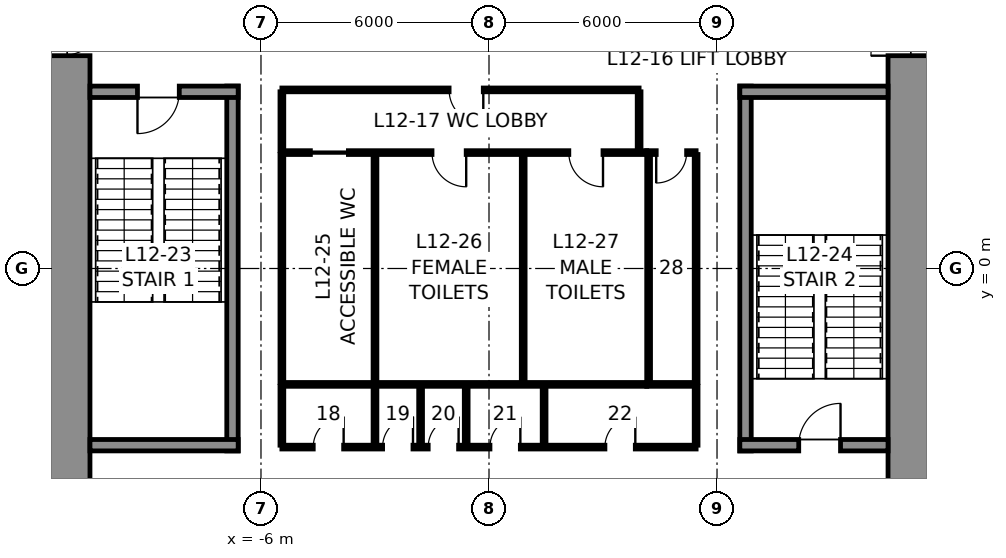
"""IFC4 building model, lengths in metres.
Left out: names, types, materials, properties, quantities, classifications, styles, units other than length and angle.
Written with IfcOpenShell. Run it as: python <this file> out.ifc"""

import sys

from ifc_helpers import new_model, si_unit, direction, frame, frame_2d, origin, place, context, subcontext, project, spatial, rectangle, extrude, element, fill, save


model = new_model("IFC4")
c1 = context("Model", 3, precision=1e-05, world=origin(), true_north=direction((0.0, 1.0)))
c2 = subcontext(c1, "Body", "Model", "MODEL_VIEW")
j1 = project(units=[si_unit("LENGTHUNIT", "METRE"), si_unit("PLANEANGLEUNIT", "RADIAN")], contexts=[c1])
p1 = place(None, origin())
s1 = spatial("IfcSite", under=j1, at=p1, CompositionType="ELEMENT")
p2 = place(p1, origin())
s2 = spatial("IfcBuilding", under=s1, at=p2, CompositionType="ELEMENT")
p3 = place(p2, frame((0.0, 0.0, 65.0)))
s3 = spatial("IfcBuildingStorey", under=s2, at=p3, CompositionType="ELEMENT", Elevation=65.0)
p4 = place(p3, frame((11.25, 10.5, 0.0), z_axis=(0.0, 0.0, 1.0), x_axis=(0.0, -1.0, 0.0)))
e1 = element("IfcWall", 1, at=p4, inside=s3, PredefinedType="SHEAR", context=c2, shape_type="SweptSolid", body=[
    extrude(rectangle(XDim=21.0, YDim=1.5, at=frame_2d((10.5, 0.0))), origin(), (0.0, 0.0, 1.0), 5.5),
])
p5 = place(p4, frame((3.7, 0.0, 0.0)))
e2 = element("IfcOpeningElement", 2, at=p5, cuts=e1, PredefinedType="OPENING", context=c2, shape_type="SweptSolid", body=[
    extrude(rectangle(XDim=1.2, YDim=2.3, at=frame_2d((0.6, 1.15))), frame((0.0, 0.76, 0.0), z_axis=(0.0, -1.0, 0.0), x_axis=(1.0, 0.0, 0.0)), (0.0, 0.0, 1.0), 1.52),
])
p6 = place(p4, frame((16.1, 0.0, 0.0)))
e3 = element("IfcOpeningElement", 3, at=p6, cuts=e1, PredefinedType="OPENING", context=c2, shape_type="SweptSolid", body=[
    extrude(rectangle(XDim=1.2, YDim=2.3, at=frame_2d((0.6, 1.15))), frame((0.0, 0.76, 0.0), z_axis=(0.0, -1.0, 0.0), x_axis=(1.0, 0.0, 0.0)), (0.0, 0.0, 1.0), 1.52),
])
p7 = place(p3, frame((-11.25, -10.5, 0.0), z_axis=(0.0, 0.0, 1.0), x_axis=(0.0, 1.0, 0.0)))
e4 = element("IfcWall", 4, at=p7, inside=s3, PredefinedType="SHEAR", context=c2, shape_type="SweptSolid", body=[
    extrude(rectangle(XDim=21.0, YDim=1.5, at=frame_2d((10.5, 0.0))), origin(), (0.0, 0.0, 1.0), 5.5),
])
p8 = place(p7, frame((16.1, 0.0, 0.0)))
e5 = element("IfcOpeningElement", 5, at=p8, cuts=e4, PredefinedType="OPENING", context=c2, shape_type="SweptSolid", body=[
    extrude(rectangle(XDim=1.2, YDim=2.3, at=frame_2d((0.6, 1.15))), frame((0.0, 0.76, 0.0), z_axis=(0.0, -1.0, 0.0), x_axis=(1.0, 0.0, 0.0)), (0.0, 0.0, 1.0), 1.52),
])
p9 = place(p7, frame((3.7, 0.0, 0.0)))
e6 = element("IfcOpeningElement", 6, at=p9, cuts=e4, PredefinedType="OPENING", context=c2, shape_type="SweptSolid", body=[
    extrude(rectangle(XDim=1.2, YDim=2.3, at=frame_2d((0.6, 1.15))), frame((0.0, 0.76, 0.0), z_axis=(0.0, -1.0, 0.0), x_axis=(1.0, 0.0, 0.0)), (0.0, 0.0, 1.0), 1.52),
])
p10 = place(p3, frame((-6.75, -4.8, 0.0), z_axis=(0.0, 0.0, 1.0), x_axis=(0.0, 1.0, 0.0)))
e7 = element("IfcWall", 7, at=p10, inside=s3, PredefinedType="SOLIDWALL", context=c2, shape_type="SweptSolid", body=[
    extrude(rectangle(XDim=9.6, YDim=0.3, at=frame_2d((4.8, 0.0))), origin(), (0.0, 0.0, 1.0), 5.25),
])
p11 = place(p3, frame((-10.5, 4.65, 0.0), z_axis=(0.0, 0.0, 1.0), x_axis=(1.0, 0.0, 0.0)))
e8 = element("IfcWall", 8, at=p11, inside=s3, PredefinedType="SOLIDWALL", context=c2, shape_type="SweptSolid", body=[
    extrude(rectangle(XDim=3.9, YDim=0.3, at=frame_2d((1.95, 0.0))), origin(), (0.0, 0.0, 1.0), 5.25),
])
p12 = place(p11, frame((1.25, 0.0, 0.0)))
e9 = element("IfcOpeningElement", 9, at=p12, cuts=e8, PredefinedType="OPENING", context=c2, shape_type="SweptSolid", body=[
    extrude(rectangle(XDim=1.1, YDim=2.3, at=frame_2d((0.55, 1.15))), frame((0.0, 0.16, 0.0), z_axis=(0.0, -1.0, 0.0), x_axis=(1.0, 0.0, 0.0)), (0.0, 0.0, 1.0), 0.32),
])
p13 = place(p3, frame((-6.6, -4.65, 0.0), z_axis=(0.0, 0.0, 1.0), x_axis=(-1.0, 0.0, 0.0)))
e10 = element("IfcWall", 10, at=p13, inside=s3, PredefinedType="SOLIDWALL", context=c2, shape_type="SweptSolid", body=[
    extrude(rectangle(XDim=3.9, YDim=0.3, at=frame_2d((1.95, 0.0))), origin(), (0.0, 0.0, 1.0), 5.25),
])
p14 = place(p3, frame((6.75, -4.8, 0.0), z_axis=(0.0, 0.0, 1.0), x_axis=(0.0, 1.0, 0.0)))
e11 = element("IfcWall", 11, at=p14, inside=s3, PredefinedType="SOLIDWALL", context=c2, shape_type="SweptSolid", body=[
    extrude(rectangle(XDim=9.6, YDim=0.3, at=frame_2d((4.8, 0.0))), origin(), (0.0, 0.0, 1.0), 5.25),
])
p15 = place(p3, frame((6.6, 4.65, 0.0), z_axis=(0.0, 0.0, 1.0), x_axis=(1.0, 0.0, 0.0)))
e12 = element("IfcWall", 12, at=p15, inside=s3, PredefinedType="SOLIDWALL", context=c2, shape_type="SweptSolid", body=[
    extrude(rectangle(XDim=3.9, YDim=0.3, at=frame_2d((1.95, 0.0))), origin(), (0.0, 0.0, 1.0), 5.25),
])
p16 = place(p3, frame((10.5, -4.65, 0.0), z_axis=(0.0, 0.0, 1.0), x_axis=(-1.0, 0.0, 0.0)))
e13 = element("IfcWall", 13, at=p16, inside=s3, PredefinedType="SOLIDWALL", context=c2, shape_type="SweptSolid", body=[
    extrude(rectangle(XDim=3.9, YDim=0.3, at=frame_2d((1.95, 0.0))), origin(), (0.0, 0.0, 1.0), 5.25),
])
p17 = place(p16, frame((1.25, 0.0, 0.0)))
e14 = element("IfcOpeningElement", 14, at=p17, cuts=e13, PredefinedType="OPENING", context=c2, shape_type="SweptSolid", body=[
    extrude(rectangle(XDim=1.1, YDim=2.3, at=frame_2d((0.55, 1.15))), frame((0.0, 0.16, 0.0), z_axis=(0.0, -1.0, 0.0), x_axis=(1.0, 0.0, 0.0)), (0.0, 0.0, 1.0), 0.32),
])
p18 = place(p3, frame((-5.45, 3.05, 0.0), z_axis=(0.0, 0.0, 1.0), x_axis=(1.0, 0.0, 0.0)))
e15 = element("IfcWall", 15, at=p18, inside=s3, PredefinedType="PARTITIONING", context=c2, shape_type="SweptSolid", body=[
    extrude(rectangle(XDim=9.6, YDim=0.1, at=frame_2d((4.8, 0.0))), origin(), (0.0, 0.0, 1.0), 5.25),
])
p19 = place(p18, frame((0.75, 0.0, 0.0)))
e16 = element("IfcOpeningElement", 16, at=p19, cuts=e15, PredefinedType="OPENING", context=c2, shape_type="SweptSolid", body=[
    extrude(rectangle(XDim=1.0, YDim=2.3, at=frame_2d((0.5, 1.15))), frame((0.0, 0.06, 0.0), z_axis=(0.0, -1.0, 0.0), x_axis=(1.0, 0.0, 0.0)), (0.0, 0.0, 1.0), 0.12),
])
p20 = place(p18, frame((3.95, 0.0, 0.0)))
e17 = element("IfcOpeningElement", 17, at=p20, cuts=e15, PredefinedType="OPENING", context=c2, shape_type="SweptSolid", body=[
    extrude(rectangle(XDim=0.9, YDim=2.3, at=frame_2d((0.45, 1.15))), frame((0.0, 0.06, 0.0), z_axis=(0.0, -1.0, 0.0), x_axis=(1.0, 0.0, 0.0)), (0.0, 0.0, 1.0), 0.12),
])
p21 = place(p18, frame((7.55, 0.0, 0.0)))
e18 = element("IfcOpeningElement", 18, at=p21, cuts=e15, PredefinedType="OPENING", context=c2, shape_type="SweptSolid", body=[
    extrude(rectangle(XDim=0.9, YDim=2.3, at=frame_2d((0.45, 1.15))), frame((0.0, 0.06, 0.0), z_axis=(0.0, -1.0, 0.0), x_axis=(1.0, 0.0, 0.0)), (0.0, 0.0, 1.0), 0.12),
])
p22 = place(p3, frame((4.15, 3.05, 0.0), z_axis=(0.0, 0.0, 1.0), x_axis=(1.0, 0.0, 0.0)))
e19 = element("IfcWall", 19, at=p22, inside=s3, PredefinedType="PARTITIONING", context=c2, shape_type="SweptSolid", body=[
    extrude(rectangle(XDim=1.3, YDim=0.1, at=frame_2d((0.65, 0.0))), origin(), (0.0, 0.0, 1.0), 5.25),
])
p23 = place(p22, frame((0.25, 0.0, 0.0)))
e20 = element("IfcOpeningElement", 20, at=p23, cuts=e19, PredefinedType="OPENING", context=c2, shape_type="SweptSolid", body=[
    extrude(rectangle(XDim=0.8, YDim=2.3, at=frame_2d((0.4, 1.15))), frame((0.0, 0.06, 0.0), z_axis=(0.0, -1.0, 0.0), x_axis=(1.0, 0.0, 0.0)), (0.0, 0.0, 1.0), 0.12),
])
p24 = place(p3, frame((4.15, -3.05, 0.0), z_axis=(0.0, 0.0, 1.0), x_axis=(-1.0, 0.0, 0.0)))
e21 = element("IfcWall", 21, at=p24, inside=s3, PredefinedType="PARTITIONING", context=c2, shape_type="SweptSolid", body=[
    extrude(rectangle(XDim=9.6, YDim=0.1, at=frame_2d((4.8, 0.0))), origin(), (0.0, 0.0, 1.0), 5.25),
])
p25 = place(p3, frame((5.45, -3.05, 0.0), z_axis=(0.0, 0.0, 1.0), x_axis=(-1.0, 0.0, 0.0)))
e22 = element("IfcWall", 22, at=p25, inside=s3, PredefinedType="PARTITIONING", context=c2, shape_type="SweptSolid", body=[
    extrude(rectangle(XDim=1.3, YDim=0.1, at=frame_2d((0.65, 0.0))), origin(), (0.0, 0.0, 1.0), 5.25),
])
for number, where, z_axis, x_axis in (
    (23, (5.45, 3.0, 0.0), (0.0, 0.0, 1.0), (0.0, -1.0, 0.0)),
    (24, (-5.45, -3.0, 0.0), (0.0, 0.0, 1.0), (0.0, 1.0, 0.0)),
    (25, (-3.0, -3.0, 0.0), (0.0, 0.0, 1.0), (0.0, 1.0, 0.0)),
    (26, (0.9, -3.0, 0.0), (0.0, 0.0, 1.0), (0.0, 1.0, 0.0)),
    (27, (4.2, -3.0, 0.0), (0.0, 0.0, 1.0), (0.0, 1.0, 0.0)),
):
    element("IfcWall", number, at=place(p3, frame(where, z_axis=z_axis, x_axis=x_axis)), inside=s3, PredefinedType="PARTITIONING", context=c2, shape_type="SweptSolid", body=[
        extrude(rectangle(XDim=6.0, YDim=0.1, at=frame_2d((3.0, 0.0))), origin(), (0.0, 0.0, 1.0), 5.25),
    ])
p26 = place(p3, frame((-5.45, 4.7, 0.0), z_axis=(0.0, 0.0, 1.0), x_axis=(1.0, 0.0, 0.0)))
e28 = element("IfcWall", 28, at=p26, inside=s3, PredefinedType="PARTITIONING", context=c2, shape_type="SweptSolid", body=[
    extrude(rectangle(XDim=9.4, YDim=0.1, at=frame_2d((4.7, 0.0))), origin(), (0.0, 0.0, 1.0), 5.25),
])
p27 = place(p26, frame((4.4, 0.0, 0.0)))
e29 = element("IfcOpeningElement", 29, at=p27, cuts=e28, PredefinedType="OPENING", context=c2, shape_type="SweptSolid", body=[
    extrude(rectangle(XDim=0.9, YDim=2.3, at=frame_2d((0.45, 1.15))), frame((0.0, 0.06, 0.0), z_axis=(0.0, -1.0, 0.0), x_axis=(1.0, 0.0, 0.0)), (0.0, 0.0, 1.0), 0.12),
])
for number, where, z_axis, x_axis in (
    (30, (-5.45, 3.1, 0.0), (0.0, 0.0, 1.0), (0.0, 1.0, 0.0)),
    (31, (3.95, 3.1, 0.0), (0.0, 0.0, 1.0), (0.0, 1.0, 0.0)),
):
    element("IfcWall", number, at=place(p3, frame(where, z_axis=z_axis, x_axis=x_axis)), inside=s3, PredefinedType="PARTITIONING", context=c2, shape_type="SweptSolid", body=[
        extrude(rectangle(XDim=1.55, YDim=0.1, at=frame_2d((0.775, 0.0))), origin(), (0.0, 0.0, 1.0), 5.25),
    ])
p28 = place(p3, frame((5.45, -4.7, 0.0), z_axis=(0.0, 0.0, 1.0), x_axis=(-1.0, 0.0, 0.0)))
e32 = element("IfcWall", 32, at=p28, inside=s3, PredefinedType="PARTITIONING", context=c2, shape_type="SweptSolid", body=[
    extrude(rectangle(XDim=10.9, YDim=0.1, at=frame_2d((5.45, 0.0))), origin(), (0.0, 0.0, 1.0), 5.25),
])
p29 = place(p28, frame((9.275, 0.0, 0.0)))
e33 = element("IfcOpeningElement", 33, at=p29, cuts=e32, PredefinedType="OPENING", context=c2, shape_type="SweptSolid", body=[
    extrude(rectangle(XDim=0.8, YDim=2.3, at=frame_2d((0.4, 1.15))), frame((0.0, 0.06, 0.0), z_axis=(0.0, -1.0, 0.0), x_axis=(1.0, 0.0, 0.0)), (0.0, 0.0, 1.0), 0.12),
])
p30 = place(p28, frame((7.45, 0.0, 0.0)))
e34 = element("IfcOpeningElement", 34, at=p30, cuts=e32, PredefinedType="OPENING", context=c2, shape_type="SweptSolid", body=[
    extrude(rectangle(XDim=0.8, YDim=2.3, at=frame_2d((0.4, 1.15))), frame((0.0, 0.06, 0.0), z_axis=(0.0, -1.0, 0.0), x_axis=(1.0, 0.0, 0.0)), (0.0, 0.0, 1.0), 0.12),
])
p31 = place(p28, frame((6.25, 0.0, 0.0)))
e35 = element("IfcOpeningElement", 35, at=p31, cuts=e32, PredefinedType="OPENING", context=c2, shape_type="SweptSolid", body=[
    extrude(rectangle(XDim=0.8, YDim=2.3, at=frame_2d((0.4, 1.15))), frame((0.0, 0.06, 0.0), z_axis=(0.0, -1.0, 0.0), x_axis=(1.0, 0.0, 0.0)), (0.0, 0.0, 1.0), 0.12),
])
p32 = place(p28, frame((4.625, 0.0, 0.0)))
e36 = element("IfcOpeningElement", 36, at=p32, cuts=e32, PredefinedType="OPENING", context=c2, shape_type="SweptSolid", body=[
    extrude(rectangle(XDim=0.8, YDim=2.3, at=frame_2d((0.4, 1.15))), frame((0.0, 0.06, 0.0), z_axis=(0.0, -1.0, 0.0), x_axis=(1.0, 0.0, 0.0)), (0.0, 0.0, 1.0), 0.12),
])
p33 = place(p28, frame((1.6, 0.0, 0.0)))
e37 = element("IfcOpeningElement", 37, at=p33, cuts=e32, PredefinedType="OPENING", context=c2, shape_type="SweptSolid", body=[
    extrude(rectangle(XDim=0.8, YDim=2.3, at=frame_2d((0.4, 1.15))), frame((0.0, 0.06, 0.0), z_axis=(0.0, -1.0, 0.0), x_axis=(1.0, 0.0, 0.0)), (0.0, 0.0, 1.0), 0.12),
])
for number, where, z_axis, x_axis in (
    (38, (-5.45, -3.1, 0.0), (0.0, 0.0, 1.0), (0.0, -1.0, 0.0)),
    (39, (5.45, -3.1, 0.0), (0.0, 0.0, 1.0), (0.0, -1.0, 0.0)),
    (40, (-3.0, -3.1, 0.0), (0.0, 0.0, 1.0), (0.0, -1.0, 0.0)),
    (41, (-1.8, -3.1, 0.0), (0.0, 0.0, 1.0), (0.0, -1.0, 0.0)),
    (42, (-0.6, -3.1, 0.0), (0.0, 0.0, 1.0), (0.0, -1.0, 0.0)),
    (43, (1.45, -3.1, 0.0), (0.0, 0.0, 1.0), (0.0, -1.0, 0.0)),
):
    element("IfcWall", number, at=place(p3, frame(where, z_axis=z_axis, x_axis=x_axis)), inside=s3, PredefinedType="PARTITIONING", context=c2, shape_type="SweptSolid", body=[
        extrude(rectangle(XDim=1.55, YDim=0.1, at=frame_2d((0.775, 0.0))), origin(), (0.0, 0.0, 1.0), 5.25),
    ])
p34 = place(p12, frame((1.1, 0.0, 0.0), z_axis=(0.0, 0.0, 1.0), x_axis=(-1.0, 0.0, 0.0)))
e44 = element("IfcDoor", 44, at=p34, inside=s3, OperationType="SINGLE_SWING_RIGHT", PredefinedType="DOOR", context=c2, shape_type="SweptSolid", body=[
    extrude(rectangle(XDim=1.1, YDim=2.3, at=frame_2d((0.55, 1.15))), frame((0.0, 0.025, 0.0), z_axis=(0.0, -1.0, 0.0), x_axis=(1.0, 0.0, 0.0)), (0.0, 0.0, 1.0), 0.05),
])
fill(e9, e44)
p35 = place(p17, frame((1.1, 0.0, 0.0), z_axis=(0.0, 0.0, 1.0), x_axis=(-1.0, 0.0, 0.0)))
e45 = element("IfcDoor", 45, at=p35, inside=s3, OperationType="SINGLE_SWING_RIGHT", PredefinedType="DOOR", context=c2, shape_type="SweptSolid", body=[
    extrude(rectangle(XDim=1.1, YDim=2.3, at=frame_2d((0.55, 1.15))), frame((0.0, 0.025, 0.0), z_axis=(0.0, -1.0, 0.0), x_axis=(1.0, 0.0, 0.0)), (0.0, 0.0, 1.0), 0.05),
])
fill(e14, e45)
p36 = place(p19, frame((1.0, 0.0, 0.0), z_axis=(0.0, 0.0, 1.0), x_axis=(-1.0, 0.0, 0.0)))
e46 = element("IfcDoor", 46, at=p36, inside=s3, OperationType="SLIDING_TO_LEFT", PredefinedType="DOOR", context=c2, shape_type="SweptSolid", body=[
    extrude(rectangle(XDim=1.0, YDim=2.3, at=frame_2d((0.5, 1.15))), frame((0.0, 0.025, 0.0), z_axis=(0.0, -1.0, 0.0), x_axis=(1.0, 0.0, 0.0)), (0.0, 0.0, 1.0), 0.05),
])
fill(e16, e46)
p37 = place(p20, frame((0.9, 0.0, 0.0), z_axis=(0.0, 0.0, 1.0), x_axis=(-1.0, 0.0, 0.0)))
e47 = element("IfcDoor", 47, at=p37, inside=s3, OperationType="SINGLE_SWING_LEFT", PredefinedType="DOOR", context=c2, shape_type="SweptSolid", body=[
    extrude(rectangle(XDim=0.9, YDim=2.3, at=frame_2d((0.45, 1.15))), frame((0.0, 0.025, 0.0), z_axis=(0.0, -1.0, 0.0), x_axis=(1.0, 0.0, 0.0)), (0.0, 0.0, 1.0), 0.05),
])
fill(e17, e47)
p38 = place(p21, frame((0.9, 0.0, 0.0), z_axis=(0.0, 0.0, 1.0), x_axis=(-1.0, 0.0, 0.0)))
e48 = element("IfcDoor", 48, at=p38, inside=s3, OperationType="SINGLE_SWING_LEFT", PredefinedType="DOOR", context=c2, shape_type="SweptSolid", body=[
    extrude(rectangle(XDim=0.9, YDim=2.3, at=frame_2d((0.45, 1.15))), frame((0.0, 0.025, 0.0), z_axis=(0.0, -1.0, 0.0), x_axis=(1.0, 0.0, 0.0)), (0.0, 0.0, 1.0), 0.05),
])
fill(e18, e48)
p39 = place(p23, frame((0.8, 0.0, 0.0), z_axis=(0.0, 0.0, 1.0), x_axis=(-1.0, 0.0, 0.0)))
e49 = element("IfcDoor", 49, at=p39, inside=s3, OperationType="SINGLE_SWING_RIGHT", PredefinedType="DOOR", context=c2, shape_type="SweptSolid", body=[
    extrude(rectangle(XDim=0.8, YDim=2.3, at=frame_2d((0.4, 1.15))), frame((0.0, 0.025, 0.0), z_axis=(0.0, -1.0, 0.0), x_axis=(1.0, 0.0, 0.0)), (0.0, 0.0, 1.0), 0.05),
])
fill(e20, e49)
p40 = place(p27, frame((0.9, 0.0, 0.0), z_axis=(0.0, 0.0, 1.0), x_axis=(-1.0, 0.0, 0.0)))
e50 = element("IfcDoor", 50, at=p40, inside=s3, OperationType="SINGLE_SWING_LEFT", PredefinedType="DOOR", context=c2, shape_type="SweptSolid", body=[
    extrude(rectangle(XDim=0.9, YDim=2.3, at=frame_2d((0.45, 1.15))), frame((0.0, 0.025, 0.0), z_axis=(0.0, -1.0, 0.0), x_axis=(1.0, 0.0, 0.0)), (0.0, 0.0, 1.0), 0.05),
])
fill(e29, e50)
p41 = place(p29, frame((0.8, 0.0, 0.0), z_axis=(0.0, 0.0, 1.0), x_axis=(-1.0, 0.0, 0.0)))
e51 = element("IfcDoor", 51, at=p41, inside=s3, OperationType="SINGLE_SWING_RIGHT", PredefinedType="DOOR", context=c2, shape_type="SweptSolid", body=[
    extrude(rectangle(XDim=0.8, YDim=2.3, at=frame_2d((0.4, 1.15))), frame((0.0, 0.025, 0.0), z_axis=(0.0, -1.0, 0.0), x_axis=(1.0, 0.0, 0.0)), (0.0, 0.0, 1.0), 0.05),
])
fill(e33, e51)
p42 = place(p30, frame((0.8, 0.0, 0.0), z_axis=(0.0, 0.0, 1.0), x_axis=(-1.0, 0.0, 0.0)))
e52 = element("IfcDoor", 52, at=p42, inside=s3, OperationType="SINGLE_SWING_RIGHT", PredefinedType="DOOR", context=c2, shape_type="SweptSolid", body=[
    extrude(rectangle(XDim=0.8, YDim=2.3, at=frame_2d((0.4, 1.15))), frame((0.0, 0.025, 0.0), z_axis=(0.0, -1.0, 0.0), x_axis=(1.0, 0.0, 0.0)), (0.0, 0.0, 1.0), 0.05),
])
fill(e34, e52)
p43 = place(p31, frame((0.8, 0.0, 0.0), z_axis=(0.0, 0.0, 1.0), x_axis=(-1.0, 0.0, 0.0)))
e53 = element("IfcDoor", 53, at=p43, inside=s3, OperationType="SINGLE_SWING_RIGHT", PredefinedType="DOOR", context=c2, shape_type="SweptSolid", body=[
    extrude(rectangle(XDim=0.8, YDim=2.3, at=frame_2d((0.4, 1.15))), frame((0.0, 0.025, 0.0), z_axis=(0.0, -1.0, 0.0), x_axis=(1.0, 0.0, 0.0)), (0.0, 0.0, 1.0), 0.05),
])
fill(e35, e53)
p44 = place(p32, frame((0.8, 0.0, 0.0), z_axis=(0.0, 0.0, 1.0), x_axis=(-1.0, 0.0, 0.0)))
e54 = element("IfcDoor", 54, at=p44, inside=s3, OperationType="SINGLE_SWING_RIGHT", PredefinedType="DOOR", context=c2, shape_type="SweptSolid", body=[
    extrude(rectangle(XDim=0.8, YDim=2.3, at=frame_2d((0.4, 1.15))), frame((0.0, 0.025, 0.0), z_axis=(0.0, -1.0, 0.0), x_axis=(1.0, 0.0, 0.0)), (0.0, 0.0, 1.0), 0.05),
])
fill(e36, e54)
p45 = place(p33, frame((0.8, 0.0, 0.0), z_axis=(0.0, 0.0, 1.0), x_axis=(-1.0, 0.0, 0.0)))
e55 = element("IfcDoor", 55, at=p45, inside=s3, OperationType="SINGLE_SWING_RIGHT", PredefinedType="DOOR", context=c2, shape_type="SweptSolid", body=[
    extrude(rectangle(XDim=0.8, YDim=2.3, at=frame_2d((0.4, 1.15))), frame((0.0, 0.025, 0.0), z_axis=(0.0, -1.0, 0.0), x_axis=(1.0, 0.0, 0.0)), (0.0, 0.0, 1.0), 0.05),
])
fill(e37, e55)
p46 = place(p8, frame((1.2, 0.0, 0.0), z_axis=(0.0, 0.0, 1.0), x_axis=(-1.0, 0.0, 0.0)))
e56 = element("IfcDoor", 56, at=p46, inside=s3, OperationType="SINGLE_SWING_LEFT", PredefinedType="DOOR", context=c2, shape_type="SweptSolid", body=[
    extrude(rectangle(XDim=1.2, YDim=2.3, at=frame_2d((0.6, 1.15))), frame((0.0, 0.025, 0.0), z_axis=(0.0, -1.0, 0.0), x_axis=(1.0, 0.0, 0.0)), (0.0, 0.0, 1.0), 0.05),
])
fill(e5, e56)
p47 = place(p5, frame((1.2, 0.0, 0.0), z_axis=(0.0, 0.0, 1.0), x_axis=(-1.0, 0.0, 0.0)))
e57 = element("IfcDoor", 57, at=p47, inside=s3, OperationType="SINGLE_SWING_LEFT", PredefinedType="DOOR", context=c2, shape_type="SweptSolid", body=[
    extrude(rectangle(XDim=1.2, YDim=2.3, at=frame_2d((0.6, 1.15))), frame((0.0, 0.025, 0.0), z_axis=(0.0, -1.0, 0.0), x_axis=(1.0, 0.0, 0.0)), (0.0, 0.0, 1.0), 0.05),
])
fill(e2, e57)
save(model, sys.argv[1])
